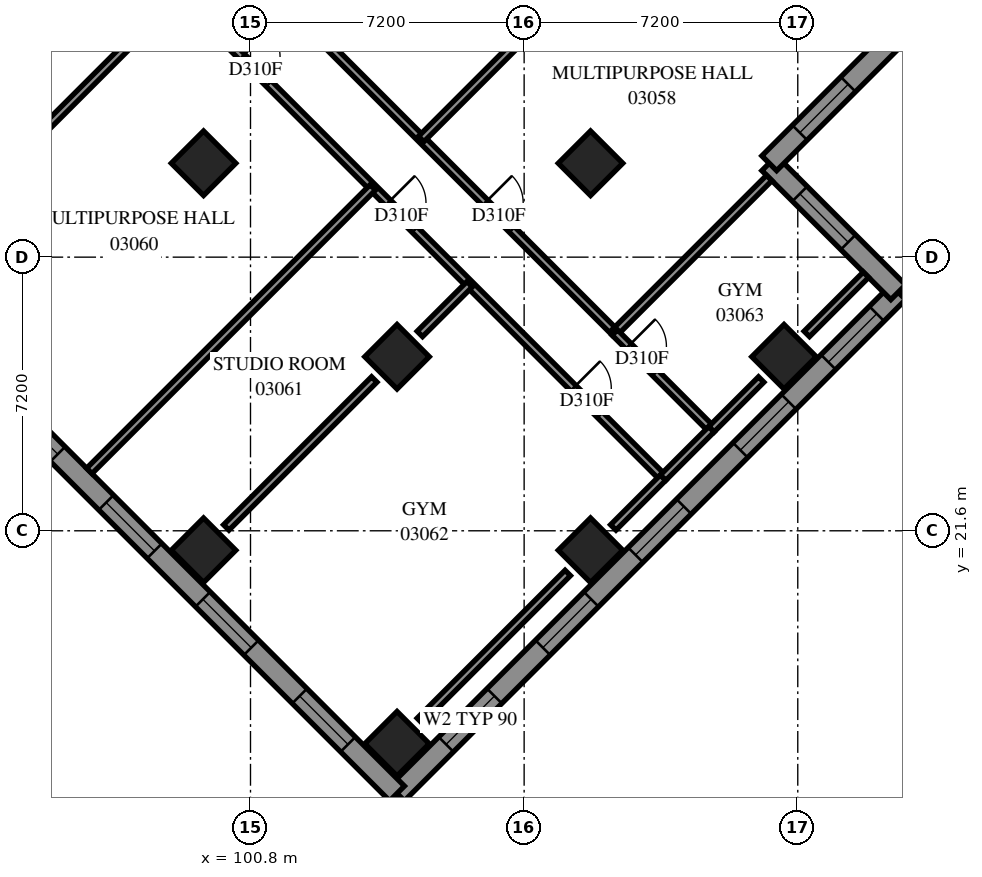
"""IFC4 building model, lengths in metres.
Left out: names, types, materials, properties, quantities, classifications, styles, units other than length and angle.
Written with IfcOpenShell. Run it as: python <this file> out.ifc"""

import sys

from ifc_helpers import new_model, si_unit, direction, frame, frame_2d, origin, origin_2d, place, context, subcontext, project, spatial, polyline, rectangle, outline, extrude, element, fill, save


model = new_model("IFC4")
c1 = context("Model", 3, precision=1e-05, world=origin(), true_north=direction((0.0, 1.0)))
c2 = subcontext(c1, "Body", "Model", "MODEL_VIEW")
j1 = project(units=[si_unit("LENGTHUNIT", "METRE"), si_unit("PLANEANGLEUNIT", "RADIAN")], contexts=[c1])
p1 = place(None, origin())
s1 = spatial("IfcSite", under=j1, at=p1, CompositionType="ELEMENT")
p2 = place(p1, origin())
s2 = spatial("IfcBuilding", under=s1, at=p2, CompositionType="ELEMENT")
p3 = place(p2, frame((0.0, 0.0, 14.4)))
s3 = spatial("IfcBuildingStorey", under=s2, at=p3, CompositionType="ELEMENT", Elevation=14.4)
for number, where, z_axis, x_axis in (
    (1, (99.565, 31.271, 0.0), (0.0, 0.0, 1.0), (0.707, -0.707, 0.0)),
    (2, (109.747, 31.271, 0.0), (0.0, 0.0, 1.0), (0.707, -0.707, 0.0)),
    (3, (104.656, 26.18, 0.0), (0.0, 0.0, 1.0), (0.707, -0.707, 0.0)),
    (4, (99.565, 21.088, 0.0), (0.0, 0.0, 1.0), (0.707, -0.707, 0.0)),
    (5, (114.838, 26.18, 0.0), (0.0, 0.0, 1.0), (0.707, -0.707, 0.0)),
    (6, (109.747, 21.088, 0.0), (0.0, 0.0, 1.0), (0.707, -0.707, 0.0)),
    (7, (104.656, 15.997, 0.0), (0.0, 0.0, 1.0), (0.707, -0.707, 0.0)),
):
    element("IfcColumn", number, at=place(p3, frame(where, z_axis=z_axis, x_axis=x_axis)), inside=s3, PredefinedType="COLUMN", context=c2, shape_type="SweptSolid", body=[
        extrude(rectangle(XDim=1.2, YDim=1.2, at=origin_2d()), origin(), (0.0, 0.0, 1.0), 3.8),
    ])
p4 = place(p3, frame((104.656, 14.689, 0.0), z_axis=(0.0, 0.0, 1.0), x_axis=(0.7071094621, 0.7071041002, 0.0)))
e8 = element("IfcWall", 8, at=p4, inside=s3, PredefinedType="SOLIDWALL", context=c2, shape_type="SweptSolid", body=[
    extrude(outline(polyline([(-0.275, -0.275), (18.925, -0.275), (18.375, 0.275), (0.275, 0.275), (-0.275, -0.275)])), origin(), (0.0, 0.0, 1.0), 3.8),
])
p5 = place(p4, frame((1.825, 0.0, 0.7)))
e9 = element("IfcOpeningElement", 9, at=p5, cuts=e8, PredefinedType="OPENING", context=c2, shape_type="SweptSolid", body=[
    extrude(rectangle(XDim=1.8, YDim=2.6, at=frame_2d((0.9, 1.3))), frame((0.0, 0.285, 0.0), z_axis=(0.0, -1.0, 0.0), x_axis=(1.0, 0.0, 0.0)), (0.0, 0.0, 1.0), 0.57),
])
p6 = place(p4, frame((5.425, 0.0, 0.7)))
e10 = element("IfcOpeningElement", 10, at=p6, cuts=e8, PredefinedType="OPENING", context=c2, shape_type="SweptSolid", body=[
    extrude(rectangle(XDim=1.8, YDim=2.6, at=frame_2d((0.9, 1.3))), frame((0.0, 0.285, 0.0), z_axis=(0.0, -1.0, 0.0), x_axis=(1.0, 0.0, 0.0)), (0.0, 0.0, 1.0), 0.57),
])
p7 = place(p4, frame((8.875, 0.0, 0.7)))
e11 = element("IfcOpeningElement", 11, at=p7, cuts=e8, PredefinedType="OPENING", context=c2, shape_type="SweptSolid", body=[
    extrude(rectangle(XDim=1.8, YDim=2.6, at=frame_2d((0.9, 1.3))), frame((0.0, 0.285, 0.0), z_axis=(0.0, -1.0, 0.0), x_axis=(1.0, 0.0, 0.0)), (0.0, 0.0, 1.0), 0.57),
])
p8 = place(p4, frame((12.775, 0.0, 0.7)))
e12 = element("IfcOpeningElement", 12, at=p8, cuts=e8, PredefinedType="OPENING", context=c2, shape_type="SweptSolid", body=[
    extrude(rectangle(XDim=1.8, YDim=2.6, at=frame_2d((0.9, 1.3))), frame((0.0, 0.285, 0.0), z_axis=(0.0, -1.0, 0.0), x_axis=(1.0, 0.0, 0.0)), (0.0, 0.0, 1.0), 0.57),
])
p9 = place(p4, frame((16.05, 0.0, 0.7)))
e13 = element("IfcOpeningElement", 13, at=p9, cuts=e8, PredefinedType="OPENING", context=c2, shape_type="SweptSolid", body=[
    extrude(rectangle(XDim=1.8, YDim=2.6, at=frame_2d((0.9, 1.3))), frame((0.0, 0.285, 0.0), z_axis=(0.0, -1.0, 0.0), x_axis=(1.0, 0.0, 0.0)), (0.0, 0.0, 1.0), 0.57),
])
p10 = place(p3, frame((117.843, 27.877, 0.0), z_axis=(0.0, 0.0, 1.0), x_axis=(-0.7071067812, 0.7071067812, 0.0)))
e14 = element("IfcWall", 14, at=p10, inside=s3, PredefinedType="SOLIDWALL", context=c2, shape_type="SweptSolid", body=[
    extrude(outline(polyline([(-0.275, -0.275), (4.525, -0.275), (5.075, 0.275), (0.275, 0.275), (-0.275, -0.275)])), origin(), (0.0, 0.0, 1.0), 3.8),
])
p11 = place(p10, frame((1.863, 0.0, 0.7)))
e15 = element("IfcOpeningElement", 15, at=p11, cuts=e14, PredefinedType="OPENING", context=c2, shape_type="SweptSolid", body=[
    extrude(rectangle(XDim=1.8, YDim=2.6, at=frame_2d((0.9, 1.3))), frame((0.0, 0.285, 0.0), z_axis=(0.0, -1.0, 0.0), x_axis=(1.0, 0.0, 0.0)), (0.0, 0.0, 1.0), 0.57),
])
p12 = place(p3, frame((114.449, 31.271, 0.0), z_axis=(0.0, 0.0, 1.0), x_axis=(0.7070963646, 0.7071171977, 0.0)))
e16 = element("IfcWall", 16, at=p12, inside=s3, PredefinedType="SOLIDWALL", context=c2, shape_type="SweptSolid", body=[
    extrude(outline(polyline([(0.275, -0.275), (5.075, -0.275), (4.525, 0.275), (-0.275, 0.275), (0.275, -0.275)])), origin(), (0.0, 0.0, 1.0), 3.8),
])
p13 = place(p12, frame((1.137, 0.0, 0.7)))
e17 = element("IfcOpeningElement", 17, at=p13, cuts=e16, PredefinedType="OPENING", context=c2, shape_type="SweptSolid", body=[
    extrude(rectangle(XDim=1.8, YDim=2.6, at=frame_2d((0.9, 1.3))), frame((0.0, 0.285, 0.0), z_axis=(0.0, -1.0, 0.0), x_axis=(1.0, 0.0, 0.0)), (0.0, 0.0, 1.0), 0.57),
])
p14 = place(p3, frame((77.07, 42.275, 0.0), z_axis=(0.0, 0.0, 1.0), x_axis=(0.7071067812, -0.7071067812, 0.0)))
e18 = element("IfcWall", 18, at=p14, inside=s3, PredefinedType="SOLIDWALL", context=c2, shape_type="SweptSolid", body=[
    extrude(outline(polyline([(0.114, -0.275), (39.288, -0.275), (38.737, 0.275), (-0.114, 0.275), (0.114, -0.275)])), origin(), (0.0, 0.0, 1.0), 3.8),
])
p15 = place(p14, frame((2.837, 0.0, 0.7)))
e19 = element("IfcOpeningElement", 19, at=p15, cuts=e18, PredefinedType="OPENING", context=c2, shape_type="SweptSolid", body=[
    extrude(rectangle(XDim=1.8, YDim=2.6, at=frame_2d((0.9, 1.3))), frame((0.0, 0.285, 0.0), z_axis=(0.0, -1.0, 0.0), x_axis=(1.0, 0.0, 0.0)), (0.0, 0.0, 1.0), 0.57),
])
p16 = place(p14, frame((6.588, 0.0, 0.7)))
e20 = element("IfcOpeningElement", 20, at=p16, cuts=e18, PredefinedType="OPENING", context=c2, shape_type="SweptSolid", body=[
    extrude(rectangle(XDim=1.8, YDim=2.6, at=frame_2d((0.9, 1.3))), frame((0.0, 0.285, 0.0), z_axis=(0.0, -1.0, 0.0), x_axis=(1.0, 0.0, 0.0)), (0.0, 0.0, 1.0), 0.57),
])
p17 = place(p14, frame((10.188, 0.0, 0.7)))
e21 = element("IfcOpeningElement", 21, at=p17, cuts=e18, PredefinedType="OPENING", context=c2, shape_type="SweptSolid", body=[
    extrude(rectangle(XDim=1.8, YDim=2.6, at=frame_2d((0.9, 1.3))), frame((0.0, 0.285, 0.0), z_axis=(0.0, -1.0, 0.0), x_axis=(1.0, 0.0, 0.0)), (0.0, 0.0, 1.0), 0.57),
])
p18 = place(p14, frame((13.787, 0.0, 0.7)))
e22 = element("IfcOpeningElement", 22, at=p18, cuts=e18, PredefinedType="OPENING", context=c2, shape_type="SweptSolid", body=[
    extrude(rectangle(XDim=1.8, YDim=2.6, at=frame_2d((0.9, 1.3))), frame((0.0, 0.285, 0.0), z_axis=(0.0, -1.0, 0.0), x_axis=(1.0, 0.0, 0.0)), (0.0, 0.0, 1.0), 0.57),
])
p19 = place(p14, frame((17.387, 0.0, 0.7)))
e23 = element("IfcOpeningElement", 23, at=p19, cuts=e18, PredefinedType="OPENING", context=c2, shape_type="SweptSolid", body=[
    extrude(rectangle(XDim=1.8, YDim=2.6, at=frame_2d((0.9, 1.3))), frame((0.0, 0.285, 0.0), z_axis=(0.0, -1.0, 0.0), x_axis=(1.0, 0.0, 0.0)), (0.0, 0.0, 1.0), 0.57),
])
p20 = place(p14, frame((20.988, 0.0, 0.7)))
e24 = element("IfcOpeningElement", 24, at=p20, cuts=e18, PredefinedType="OPENING", context=c2, shape_type="SweptSolid", body=[
    extrude(rectangle(XDim=1.8, YDim=2.6, at=frame_2d((0.9, 1.3))), frame((0.0, 0.285, 0.0), z_axis=(0.0, -1.0, 0.0), x_axis=(1.0, 0.0, 0.0)), (0.0, 0.0, 1.0), 0.57),
])
p21 = place(p14, frame((24.587, 0.0, 0.7)))
e25 = element("IfcOpeningElement", 25, at=p21, cuts=e18, PredefinedType="OPENING", context=c2, shape_type="SweptSolid", body=[
    extrude(rectangle(XDim=1.8, YDim=2.6, at=frame_2d((0.9, 1.3))), frame((0.0, 0.285, 0.0), z_axis=(0.0, -1.0, 0.0), x_axis=(1.0, 0.0, 0.0)), (0.0, 0.0, 1.0), 0.57),
])
p22 = place(p14, frame((28.188, 0.0, 0.7)))
e26 = element("IfcOpeningElement", 26, at=p22, cuts=e18, PredefinedType="OPENING", context=c2, shape_type="SweptSolid", body=[
    extrude(rectangle(XDim=1.8, YDim=2.6, at=frame_2d((0.9, 1.3))), frame((0.0, 0.285, 0.0), z_axis=(0.0, -1.0, 0.0), x_axis=(1.0, 0.0, 0.0)), (0.0, 0.0, 1.0), 0.57),
])
p23 = place(p14, frame((31.788, 0.0, 0.7)))
e27 = element("IfcOpeningElement", 27, at=p23, cuts=e18, PredefinedType="OPENING", context=c2, shape_type="SweptSolid", body=[
    extrude(rectangle(XDim=1.8, YDim=2.6, at=frame_2d((0.9, 1.3))), frame((0.0, 0.285, 0.0), z_axis=(0.0, -1.0, 0.0), x_axis=(1.0, 0.0, 0.0)), (0.0, 0.0, 1.0), 0.57),
])
p24 = place(p14, frame((35.388, 0.0, 0.7)))
e28 = element("IfcOpeningElement", 28, at=p24, cuts=e18, PredefinedType="OPENING", context=c2, shape_type="SweptSolid", body=[
    extrude(rectangle(XDim=1.8, YDim=2.6, at=frame_2d((0.9, 1.3))), frame((0.0, 0.285, 0.0), z_axis=(0.0, -1.0, 0.0), x_axis=(1.0, 0.0, 0.0)), (0.0, 0.0, 1.0), 0.57),
])
p25 = place(p3, frame((93.835, 40.813, 0.0), z_axis=(0.0, 0.0, 1.0), x_axis=(0.7071067812, -0.7071067812, 0.0)))
e29 = element("IfcWall", 29, at=p25, inside=s3, PredefinedType="PARTITIONING", context=c2, shape_type="SweptSolid", body=[
    extrude(rectangle(XDim=25.198, YDim=0.2, at=frame_2d((12.599, 0.0))), origin(), (0.0, 0.0, 1.0), 3.8),
])
p26 = place(p25, frame((2.337, 0.0, 0.0)))
e30 = element("IfcOpeningElement", 30, at=p26, cuts=e29, PredefinedType="OPENING", context=c2, shape_type="SweptSolid", body=[
    extrude(rectangle(XDim=1.0, YDim=2.1, at=frame_2d((0.5, 1.05))), frame((0.0, 0.11, 0.0), z_axis=(0.0, -1.0, 0.0), x_axis=(1.0, 0.0, 0.0)), (0.0, 0.0, 1.0), 0.22),
])
p27 = place(p25, frame((9.537, 0.0, 0.0)))
e31 = element("IfcOpeningElement", 31, at=p27, cuts=e29, PredefinedType="OPENING", context=c2, shape_type="SweptSolid", body=[
    extrude(rectangle(XDim=1.0, YDim=2.1, at=frame_2d((0.5, 1.05))), frame((0.0, 0.11, 0.0), z_axis=(0.0, -1.0, 0.0), x_axis=(1.0, 0.0, 0.0)), (0.0, 0.0, 1.0), 0.22),
])
p28 = place(p25, frame((14.966, 0.0, 0.0)))
e32 = element("IfcOpeningElement", 32, at=p28, cuts=e29, PredefinedType="OPENING", context=c2, shape_type="SweptSolid", body=[
    extrude(rectangle(XDim=1.0, YDim=2.1, at=frame_2d((0.5, 1.05))), frame((0.0, 0.11, 0.0), z_axis=(0.0, -1.0, 0.0), x_axis=(1.0, 0.0, 0.0)), (0.0, 0.0, 1.0), 0.22),
])
p29 = place(p25, frame((21.861, 0.0, 0.0)))
e33 = element("IfcOpeningElement", 33, at=p29, cuts=e29, PredefinedType="OPENING", context=c2, shape_type="SweptSolid", body=[
    extrude(rectangle(XDim=1.0, YDim=2.1, at=frame_2d((0.5, 1.05))), frame((0.0, 0.11, 0.0), z_axis=(0.0, -1.0, 0.0), x_axis=(1.0, 0.0, 0.0)), (0.0, 0.0, 1.0), 0.22),
])
p30 = place(p3, frame((94.689, 42.517, 0.0), z_axis=(0.0, 0.0, 1.0), x_axis=(0.7071067812, -0.7071067812, 0.0)))
e34 = element("IfcWall", 34, at=p30, inside=s3, PredefinedType="PARTITIONING", context=c2, shape_type="SweptSolid", body=[
    extrude(rectangle(XDim=22.2, YDim=0.2, at=frame_2d((11.1, 0.0))), origin(), (0.0, 0.0, 1.0), 3.8),
])
p31 = place(p30, frame((2.974, 0.0, 0.0)))
e35 = element("IfcOpeningElement", 35, at=p31, cuts=e34, PredefinedType="OPENING", context=c2, shape_type="SweptSolid", body=[
    extrude(rectangle(XDim=1.0, YDim=2.1, at=frame_2d((0.5, 1.05))), frame((0.0, 0.11, 0.0), z_axis=(0.0, -1.0, 0.0), x_axis=(1.0, 0.0, 0.0)), (0.0, 0.0, 1.0), 0.22),
])
p32 = place(p30, frame((10.174, 0.0, 0.0)))
e36 = element("IfcOpeningElement", 36, at=p32, cuts=e34, PredefinedType="OPENING", context=c2, shape_type="SweptSolid", body=[
    extrude(rectangle(XDim=1.0, YDim=2.1, at=frame_2d((0.5, 1.05))), frame((0.0, 0.11, 0.0), z_axis=(0.0, -1.0, 0.0), x_axis=(1.0, 0.0, 0.0)), (0.0, 0.0, 1.0), 0.22),
])
p33 = place(p30, frame((17.374, 0.0, 0.0)))
e37 = element("IfcOpeningElement", 37, at=p33, cuts=e34, PredefinedType="OPENING", context=c2, shape_type="SweptSolid", body=[
    extrude(rectangle(XDim=1.0, YDim=2.1, at=frame_2d((0.5, 1.05))), frame((0.0, 0.11, 0.0), z_axis=(0.0, -1.0, 0.0), x_axis=(1.0, 0.0, 0.0)), (0.0, 0.0, 1.0), 0.22),
])
for number, where, z_axis, x_axis in (
    (38, (96.559, 23.175, 0.0), (0.0, 0.0, 1.0), (0.707, 0.707, 0.0)),
    (39, (91.468, 28.266, 0.0), (0.0, 0.0, 1.0), (0.707, 0.707, 0.0)),
):
    element("IfcWall", number, at=place(p3, frame(where, z_axis=z_axis, x_axis=x_axis)), inside=s3, PredefinedType="PARTITIONING", context=c2, shape_type="SweptSolid", body=[
        extrude(rectangle(XDim=10.55, YDim=0.2, at=frame_2d((5.275, 0.0))), origin(), (0.0, 0.0, 1.0), 3.8),
    ])
p34 = place(p3, frame((105.292, 31.908, 0.0), z_axis=(0.0, 0.0, 1.0), x_axis=(0.7071020416, 0.7071115207, 0.0)))
e40 = element("IfcWall", 40, at=p34, inside=s3, PredefinedType="PARTITIONING", context=c2, shape_type="SweptSolid", body=[
    extrude(rectangle(XDim=10.55, YDim=0.2, at=frame_2d((5.275, 0.0))), origin(), (0.0, 0.0, 1.0), 3.8),
])
p35 = place(p3, frame((110.383, 26.817, 0.0), z_axis=(0.0, 0.0, 1.0), x_axis=(0.7071067812, 0.7071067812, 0.0)))
e41 = element("IfcWall", 41, at=p35, inside=s3, PredefinedType="PARTITIONING", context=c2, shape_type="SweptSolid", body=[
    extrude(rectangle(XDim=5.75, YDim=0.2, at=frame_2d((2.875, 0.0))), origin(), (0.0, 0.0, 1.0), 3.8),
])
p36 = place(p3, frame((100.162, 21.688, 0.0), z_axis=(0.0, 0.0, 1.0), x_axis=(0.7071067812, 0.7071067812, 0.0)))
e42 = element("IfcWall", 42, at=p36, inside=s3, PredefinedType="PARTITIONING", context=c2, shape_type="SweptSolid", body=[
    extrude(rectangle(XDim=5.507, YDim=0.2, at=frame_2d((2.753, 0.0))), origin(), (0.0, 0.0, 1.0), 3.8),
])
p37 = place(p3, frame((105.255, 16.599, 0.0), z_axis=(0.0, 0.0, 1.0), x_axis=(0.7071067812, 0.7071067812, 0.0)))
e43 = element("IfcWall", 43, at=p37, inside=s3, PredefinedType="PARTITIONING", context=c2, shape_type="SweptSolid", body=[
    extrude(rectangle(XDim=5.504, YDim=0.2, at=frame_2d((2.752, 0.0))), origin(), (0.0, 0.0, 1.0), 3.2),
])
p38 = place(p3, frame((110.385, 26.817, 0.0), z_axis=(0.0, 0.0, 1.0), x_axis=(0.7068288851, -0.7073845681, 0.0)))
e44 = element("IfcWall", 44, at=p38, inside=s3, PredefinedType="PARTITIONING", context=c2, shape_type="SweptSolid", body=[
    extrude(rectangle(XDim=3.599, YDim=0.2, at=frame_2d((1.8, 0.0))), origin(), (0.0, 0.0, 1.0), 3.8),
])
p39 = place(p38, frame((0.507, 0.0, 0.0)))
e45 = element("IfcOpeningElement", 45, at=p39, cuts=e44, PredefinedType="OPENING", context=c2, shape_type="SweptSolid", body=[
    extrude(rectangle(XDim=1.0, YDim=2.1, at=frame_2d((0.5, 1.05))), frame((0.0, 0.11, 0.0), z_axis=(0.0, -1.0, 0.0), x_axis=(1.0, 0.0, 0.0)), (0.0, 0.0, 1.0), 0.22),
])
p40 = place(p3, frame((115.438, 26.78, 0.0), z_axis=(0.0, 0.0, 1.0), x_axis=(0.7071067812, 0.7071067812, 0.0)))
e46 = element("IfcWall", 46, at=p40, inside=s3, PredefinedType="PARTITIONING", context=c2, shape_type="SweptSolid", body=[
    extrude(rectangle(XDim=2.201, YDim=0.2, at=frame_2d((1.101, 0.0))), origin(), (0.0, 0.0, 1.0), 3.8),
])
for number, where, z_axis, x_axis in (
    (47, (110.346, 21.689, 0.0), (0.0, 0.0, 1.0), (0.707, 0.707, 0.0)),
    (48, (112.927, 24.27, 0.0), (0.0, 0.0, 1.0), (0.707, 0.707, 0.0)),
):
    element("IfcWall", number, at=place(p3, frame(where, z_axis=z_axis, x_axis=x_axis)), inside=s3, PredefinedType="PARTITIONING", context=c2, shape_type="SweptSolid", body=[
        extrude(rectangle(XDim=1.853, YDim=0.2, at=frame_2d((0.926, 0.0))), origin(), (0.0, 0.0, 1.0), 3.2),
    ])
p41 = place(p3, frame((105.256, 26.78, 0.0), z_axis=(0.0, 0.0, 1.0), x_axis=(0.7076467632, 0.7065663865, 0.0)))
e49 = element("IfcWall", 49, at=p41, inside=s3, PredefinedType="PARTITIONING", context=c2, shape_type="SweptSolid", body=[
    extrude(rectangle(XDim=1.851, YDim=0.2, at=frame_2d((0.926, 0.0))), origin(), (0.0, 0.0, 1.0), 3.8),
])
p42 = place(p3, frame((111.656, 22.998, 0.0), z_axis=(0.0, 0.0, 1.0), x_axis=(0.7071067812, 0.7071067812, 0.0)))
e50 = element("IfcWall", 50, at=p42, inside=s3, PredefinedType="PARTITIONING", context=c2, shape_type="SweptSolid", body=[
    extrude(rectangle(XDim=1.799, YDim=0.2, at=frame_2d((0.899, 0.0))), origin(), (0.0, 0.0, 1.0), 3.2),
])
p43 = place(p5, origin())
e51 = element("IfcWindow", 51, at=p43, inside=s3, PartitioningType="SINGLE_PANEL", PredefinedType="WINDOW", context=c2, shape_type="SweptSolid", body=[
    extrude(rectangle(XDim=1.8, YDim=2.6, at=frame_2d((0.9, 1.3))), frame((0.0, 0.155, 0.0), z_axis=(0.0, -1.0, 0.0), x_axis=(1.0, 0.0, 0.0)), (0.0, 0.0, 1.0), 0.06),
])
fill(e9, e51)
p44 = place(p6, origin())
e52 = element("IfcWindow", 52, at=p44, inside=s3, PartitioningType="SINGLE_PANEL", PredefinedType="WINDOW", context=c2, shape_type="SweptSolid", body=[
    extrude(rectangle(XDim=1.8, YDim=2.6, at=frame_2d((0.9, 1.3))), frame((0.0, 0.155, 0.0), z_axis=(0.0, -1.0, 0.0), x_axis=(1.0, 0.0, 0.0)), (0.0, 0.0, 1.0), 0.06),
])
fill(e10, e52)
p45 = place(p7, origin())
e53 = element("IfcWindow", 53, at=p45, inside=s3, PartitioningType="SINGLE_PANEL", PredefinedType="WINDOW", context=c2, shape_type="SweptSolid", body=[
    extrude(rectangle(XDim=1.8, YDim=2.6, at=frame_2d((0.9, 1.3))), frame((0.0, 0.155, 0.0), z_axis=(0.0, -1.0, 0.0), x_axis=(1.0, 0.0, 0.0)), (0.0, 0.0, 1.0), 0.06),
])
fill(e11, e53)
p46 = place(p8, origin())
e54 = element("IfcWindow", 54, at=p46, inside=s3, PartitioningType="SINGLE_PANEL", PredefinedType="WINDOW", context=c2, shape_type="SweptSolid", body=[
    extrude(rectangle(XDim=1.8, YDim=2.6, at=frame_2d((0.9, 1.3))), frame((0.0, 0.155, 0.0), z_axis=(0.0, -1.0, 0.0), x_axis=(1.0, 0.0, 0.0)), (0.0, 0.0, 1.0), 0.06),
])
fill(e12, e54)
p47 = place(p9, origin())
e55 = element("IfcWindow", 55, at=p47, inside=s3, PartitioningType="SINGLE_PANEL", PredefinedType="WINDOW", context=c2, shape_type="SweptSolid", body=[
    extrude(rectangle(XDim=1.8, YDim=2.6, at=frame_2d((0.9, 1.3))), frame((0.0, 0.155, 0.0), z_axis=(0.0, -1.0, 0.0), x_axis=(1.0, 0.0, 0.0)), (0.0, 0.0, 1.0), 0.06),
])
fill(e13, e55)
p48 = place(p11, origin())
e56 = element("IfcWindow", 56, at=p48, inside=s3, PartitioningType="SINGLE_PANEL", PredefinedType="WINDOW", context=c2, shape_type="SweptSolid", body=[
    extrude(rectangle(XDim=1.8, YDim=2.6, at=frame_2d((0.9, 1.3))), frame((0.0, 0.155, 0.0), z_axis=(0.0, -1.0, 0.0), x_axis=(1.0, 0.0, 0.0)), (0.0, 0.0, 1.0), 0.06),
])
fill(e15, e56)
p49 = place(p13, origin())
e57 = element("IfcWindow", 57, at=p49, inside=s3, PartitioningType="SINGLE_PANEL", PredefinedType="WINDOW", context=c2, shape_type="SweptSolid", body=[
    extrude(rectangle(XDim=1.8, YDim=2.6, at=frame_2d((0.9, 1.3))), frame((0.0, 0.155, 0.0), z_axis=(0.0, -1.0, 0.0), x_axis=(1.0, 0.0, 0.0)), (0.0, 0.0, 1.0), 0.06),
])
fill(e17, e57)
p50 = place(p21, origin())
e58 = element("IfcWindow", 58, at=p50, inside=s3, PartitioningType="SINGLE_PANEL", PredefinedType="WINDOW", context=c2, shape_type="SweptSolid", body=[
    extrude(rectangle(XDim=1.8, YDim=2.6, at=frame_2d((0.9, 1.3))), frame((0.0, 0.155, 0.0), z_axis=(0.0, -1.0, 0.0), x_axis=(1.0, 0.0, 0.0)), (0.0, 0.0, 1.0), 0.06),
])
fill(e25, e58)
p51 = place(p22, origin())
e59 = element("IfcWindow", 59, at=p51, inside=s3, PartitioningType="SINGLE_PANEL", PredefinedType="WINDOW", context=c2, shape_type="SweptSolid", body=[
    extrude(rectangle(XDim=1.8, YDim=2.6, at=frame_2d((0.9, 1.3))), frame((0.0, 0.155, 0.0), z_axis=(0.0, -1.0, 0.0), x_axis=(1.0, 0.0, 0.0)), (0.0, 0.0, 1.0), 0.06),
])
fill(e26, e59)
p52 = place(p23, origin())
e60 = element("IfcWindow", 60, at=p52, inside=s3, PartitioningType="SINGLE_PANEL", PredefinedType="WINDOW", context=c2, shape_type="SweptSolid", body=[
    extrude(rectangle(XDim=1.8, YDim=2.6, at=frame_2d((0.9, 1.3))), frame((0.0, 0.155, 0.0), z_axis=(0.0, -1.0, 0.0), x_axis=(1.0, 0.0, 0.0)), (0.0, 0.0, 1.0), 0.06),
])
fill(e27, e60)
p53 = place(p24, origin())
e61 = element("IfcWindow", 61, at=p53, inside=s3, PartitioningType="SINGLE_PANEL", PredefinedType="WINDOW", context=c2, shape_type="SweptSolid", body=[
    extrude(rectangle(XDim=1.8, YDim=2.6, at=frame_2d((0.9, 1.3))), frame((0.0, 0.155, 0.0), z_axis=(0.0, -1.0, 0.0), x_axis=(1.0, 0.0, 0.0)), (0.0, 0.0, 1.0), 0.06),
])
fill(e28, e61)
p54 = place(p33, origin())
e62 = element("IfcDoor", 62, at=p54, inside=s3, OperationType="SINGLE_SWING_RIGHT", PredefinedType="DOOR", context=c2, shape_type="SweptSolid", body=[
    extrude(rectangle(XDim=1.0, YDim=2.1, at=frame_2d((0.5, 1.05))), frame((0.0, 0.025, 0.0), z_axis=(0.0, -1.0, 0.0), x_axis=(1.0, 0.0, 0.0)), (0.0, 0.0, 1.0), 0.05),
])
fill(e37, e62)
p55 = place(p27, origin())
e63 = element("IfcDoor", 63, at=p55, inside=s3, OperationType="SINGLE_SWING_LEFT", PredefinedType="DOOR", context=c2, shape_type="SweptSolid", body=[
    extrude(rectangle(XDim=1.0, YDim=2.1, at=frame_2d((0.5, 1.05))), frame((0.0, 0.025, 0.0), z_axis=(0.0, -1.0, 0.0), x_axis=(1.0, 0.0, 0.0)), (0.0, 0.0, 1.0), 0.05),
])
fill(e31, e63)
p56 = place(p28, origin())
e64 = element("IfcDoor", 64, at=p56, inside=s3, OperationType="SINGLE_SWING_LEFT", PredefinedType="DOOR", context=c2, shape_type="SweptSolid", body=[
    extrude(rectangle(XDim=1.0, YDim=2.1, at=frame_2d((0.5, 1.05))), frame((0.0, 0.025, 0.0), z_axis=(0.0, -1.0, 0.0), x_axis=(1.0, 0.0, 0.0)), (0.0, 0.0, 1.0), 0.05),
])
fill(e32, e64)
p57 = place(p29, origin())
e65 = element("IfcDoor", 65, at=p57, inside=s3, OperationType="SINGLE_SWING_RIGHT", PredefinedType="DOOR", context=c2, shape_type="SweptSolid", body=[
    extrude(rectangle(XDim=1.0, YDim=2.1, at=frame_2d((0.5, 1.05))), frame((0.0, 0.025, 0.0), z_axis=(0.0, -1.0, 0.0), x_axis=(1.0, 0.0, 0.0)), (0.0, 0.0, 1.0), 0.05),
])
fill(e33, e65)
p58 = place(p39, origin())
e66 = element("IfcDoor", 66, at=p58, inside=s3, OperationType="SINGLE_SWING_RIGHT", PredefinedType="DOOR", context=c2, shape_type="SweptSolid", body=[
    extrude(rectangle(XDim=1.0, YDim=2.1, at=frame_2d((0.5, 1.05))), frame((0.0, 0.025, 0.0), z_axis=(0.0, -1.0, 0.0), x_axis=(1.0, 0.0, 0.0)), (0.0, 0.0, 1.0), 0.05),
])
fill(e45, e66)
save(model, sys.argv[1])
